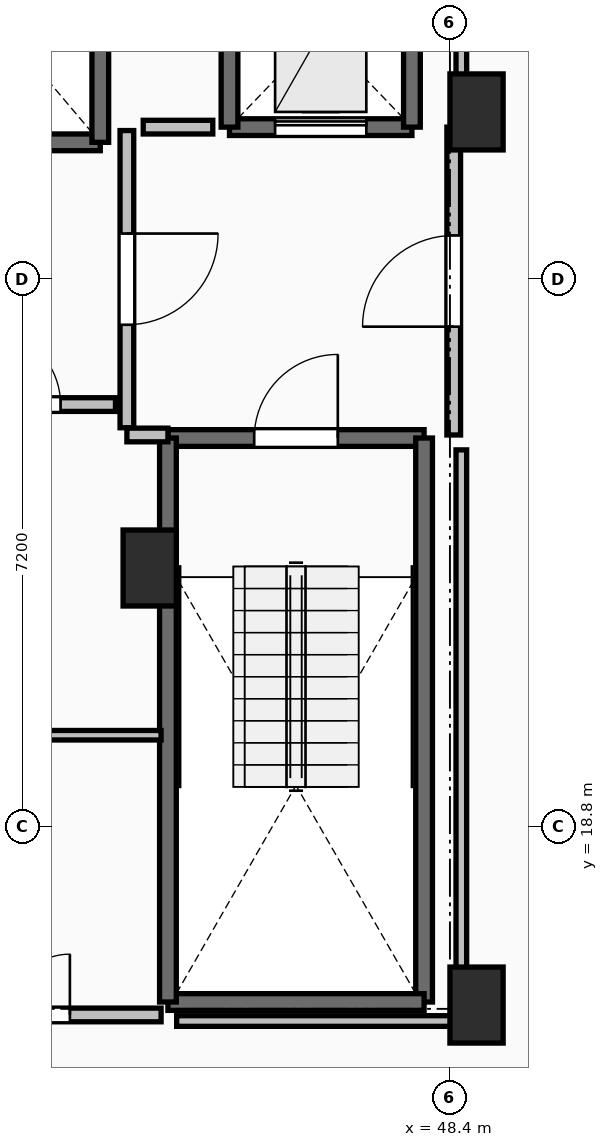
"""IFC4 building model, lengths in metres.
Left out: names, types, materials, properties, quantities, classifications, styles, units other than length and angle.
Written with IfcOpenShell. Run it as: python <this file> out.ifc"""

import sys

from ifc_helpers import new_model, si_unit, direction, frame, frame_2d, origin, origin_2d, place, context, subcontext, project, spatial, rectangle, extrude, element, fill, save


model = new_model("IFC4")
c1 = context("Model", 3, precision=1e-05, world=origin(), true_north=direction((0.0, 1.0)))
c2 = subcontext(c1, "Body", "Model", "MODEL_VIEW")
j1 = project(units=[si_unit("LENGTHUNIT", "METRE"), si_unit("PLANEANGLEUNIT", "RADIAN")], contexts=[c1])
p1 = place(None, origin())
s1 = spatial("IfcSite", under=j1, at=p1, CompositionType="ELEMENT")
p2 = place(p1, origin())
s2 = spatial("IfcBuilding", under=s1, at=p2, CompositionType="ELEMENT")
p3 = place(p2, frame((0.0, 0.0, 217.85)))
s3 = spatial("IfcBuildingStorey", under=s2, at=p3, CompositionType="ELEMENT", Elevation=217.85)
for number, where, z_axis, x_axis in (
    (1, (48.75, 28.2, 0.0), (0.0, 0.0, 1.0), (1.0, 0.0, 0.0)),
    (2, (48.75, 16.45, 0.0), (0.0, 0.0, 1.0), (1.0, 0.0, 0.0)),
    (3, (44.45, 22.2, 0.0), (0.0, 0.0, 1.0), (1.0, 0.0, 0.0)),
):
    element("IfcColumn", number, at=place(p3, frame(where, z_axis=z_axis, x_axis=x_axis)), inside=s3, PredefinedType="PILASTER", context=c2, shape_type="SweptSolid", body=[
        extrude(rectangle(XDim=0.7, YDim=1.0, at=origin_2d()), origin(), (0.0, 0.0, 1.0), 3.55),
    ])
p4 = place(p3, frame((44.69, 23.91, 0.0), z_axis=(0.0, 0.0, 1.0), x_axis=(1.0, 0.0, 0.0)))
e4 = element("IfcWall", 4, at=p4, inside=s3, PredefinedType="SOLIDWALL", context=c2, shape_type="SweptSolid", body=[
    extrude(rectangle(XDim=3.37, YDim=0.22, at=frame_2d((1.685, 0.0))), origin(), (0.0, 0.0, 1.0), 3.29),
])
p5 = place(p4, frame((1.135, 0.0, 0.0)))
e5 = element("IfcOpeningElement", 5, at=p5, cuts=e4, PredefinedType="OPENING", context=c2, shape_type="SweptSolid", body=[
    extrude(rectangle(XDim=1.1, YDim=2.15, at=frame_2d((0.55, 1.075))), frame((0.0, 0.125, 0.0), z_axis=(0.0, -1.0, 0.0), x_axis=(1.0, 0.0, 0.0)), (0.0, 0.0, 1.0), 0.25),
])
p6 = place(p3, frame((48.06, 23.91, 0.0), z_axis=(0.0, 0.0, 1.0), x_axis=(0.0, -1.0, 0.0)))
e6 = element("IfcWall", 6, at=p6, inside=s3, PredefinedType="SOLIDWALL", context=c2, shape_type="SweptSolid", body=[
    extrude(rectangle(XDim=7.42, YDim=0.22, at=frame_2d((3.71, 0.0))), origin(), (0.0, 0.0, 1.0), 3.29),
])
p7 = place(p3, frame((48.06, 16.49, 0.0), z_axis=(0.0, 0.0, 1.0), x_axis=(-1.0, 0.0, 0.0)))
e7 = element("IfcWall", 7, at=p7, inside=s3, PredefinedType="SOLIDWALL", context=c2, shape_type="SweptSolid", body=[
    extrude(rectangle(XDim=3.37, YDim=0.22, at=frame_2d((1.685, 0.0))), origin(), (0.0, 0.0, 1.0), 3.29),
])
p8 = place(p3, frame((44.69, 16.49, 0.0), z_axis=(0.0, 0.0, 1.0), x_axis=(0.0, 1.0, 0.0)))
e8 = element("IfcWall", 8, at=p8, inside=s3, PredefinedType="SOLIDWALL", context=c2, shape_type="SweptSolid", body=[
    extrude(rectangle(XDim=7.42, YDim=0.22, at=frame_2d((3.71, 0.0))), origin(), (0.0, 0.0, 1.0), 3.29),
])
p9 = place(p3, frame((41.6, 27.8, 0.0), z_axis=(0.0, 0.0, 1.0), x_axis=(1.0, 0.0, 0.0)))
e9 = element("IfcWall", 9, at=p9, inside=s3, PredefinedType="SOLIDWALL", context=c2, shape_type="SweptSolid", body=[
    extrude(rectangle(XDim=2.2, YDim=0.22, at=frame_2d((1.1, 0.0))), origin(), (0.0, 0.0, 1.0), 3.29),
])
p10 = place(p3, frame((43.8, 27.8, 0.0), z_axis=(0.0, 0.0, 1.0), x_axis=(0.0, 1.0, 0.0)))
e10 = element("IfcWall", 10, at=p10, inside=s3, PredefinedType="SOLIDWALL", context=c2, shape_type="SweptSolid", body=[
    extrude(rectangle(XDim=2.6, YDim=0.22, at=frame_2d((1.3, 0.0))), origin(), (0.0, 0.0, 1.0), 3.29),
])
p11 = place(p3, frame((45.5, 28.0, 0.0), z_axis=(0.0, 0.0, 1.0), x_axis=(1.0, 0.0, 0.0)))
e11 = element("IfcWall", 11, at=p11, inside=s3, PredefinedType="SHEAR", context=c2, shape_type="SweptSolid", body=[
    extrude(rectangle(XDim=2.4, YDim=0.22, at=frame_2d((1.2, 0.0))), origin(), (0.0, 0.0, 1.0), 3.29),
])
p12 = place(p11, frame((0.6, 0.0, 0.0)))
e12 = element("IfcOpeningElement", 12, at=p12, cuts=e11, PredefinedType="OPENING", context=c2, shape_type="SweptSolid", body=[
    extrude(rectangle(XDim=1.2, YDim=2.2, at=frame_2d((0.6, 1.1))), frame((0.0, 0.125, 0.0), z_axis=(0.0, -1.0, 0.0), x_axis=(1.0, 0.0, 0.0)), (0.0, 0.0, 1.0), 0.25),
])
for number, where, z_axis, x_axis in (
    (13, (47.9, 28.0, 0.0), (0.0, 0.0, 1.0), (0.0, 1.0, 0.0)),
    (14, (45.5, 30.5, 0.0), (0.0, 0.0, 1.0), (0.0, -1.0, 0.0)),
):
    element("IfcWall", number, at=place(p3, frame(where, z_axis=z_axis, x_axis=x_axis)), inside=s3, PredefinedType="SHEAR", context=c2, shape_type="SweptSolid", body=[
        extrude(rectangle(XDim=2.5, YDim=0.22, at=frame_2d((1.25, 0.0))), origin(), (0.0, 0.0, 1.0), 3.29),
    ])
p13 = place(p3, frame((44.15, 27.955, 0.0), z_axis=(0.0, 0.0, 1.0), x_axis=(0.0, -1.0, 0.0)))
e15 = element("IfcWall", 15, at=p13, inside=s3, PredefinedType="PARTITIONING", context=c2, shape_type="SweptSolid", body=[
    extrude(rectangle(XDim=3.91, YDim=0.18, at=frame_2d((1.955, 0.0))), origin(), (0.0, 0.0, 1.0), 3.29),
])
p14 = place(p13, frame((1.355, 0.0, 0.0)))
e16 = element("IfcOpeningElement", 16, at=p14, cuts=e15, PredefinedType="OPENING", context=c2, shape_type="SweptSolid", body=[
    extrude(rectangle(XDim=1.2, YDim=2.15, at=frame_2d((0.6, 1.075))), frame((0.0, 0.105, 0.0), z_axis=(0.0, -1.0, 0.0), x_axis=(1.0, 0.0, 0.0)), (0.0, 0.0, 1.0), 0.21),
])
p15 = place(p3, frame((44.15, 23.95, 0.0), z_axis=(0.0, 0.0, 1.0), x_axis=(1.0, 0.0, 0.0)))
e17 = element("IfcWall", 17, at=p15, inside=s3, PredefinedType="PARTITIONING", context=c2, shape_type="SweptSolid", body=[
    extrude(rectangle(XDim=0.54, YDim=0.18, at=frame_2d((0.27, 0.0))), origin(), (0.0, 0.0, 1.0), 3.29),
])
p16 = place(p3, frame((48.45, 23.95, 0.0), z_axis=(0.0, 0.0, 1.0), x_axis=(0.0, 1.0, 0.0)))
e18 = element("IfcWall", 18, at=p16, inside=s3, PredefinedType="PARTITIONING", context=c2, shape_type="SweptSolid", body=[
    extrude(rectangle(XDim=4.05, YDim=0.18, at=frame_2d((2.025, 0.0))), origin(), (0.0, 0.0, 1.0), 3.29),
])
p17 = place(p16, frame((1.425, 0.0, 0.0)))
e19 = element("IfcOpeningElement", 19, at=p17, cuts=e18, PredefinedType="OPENING", context=c2, shape_type="SweptSolid", body=[
    extrude(rectangle(XDim=1.2, YDim=2.15, at=frame_2d((0.6, 1.075))), frame((0.0, 0.105, 0.0), z_axis=(0.0, -1.0, 0.0), x_axis=(1.0, 0.0, 0.0)), (0.0, 0.0, 1.0), 0.21),
])
p18 = place(p3, frame((41.555, 24.35, 0.0), z_axis=(0.0, 0.0, 1.0), x_axis=(1.0, 0.0, 0.0)))
e20 = element("IfcWall", 20, at=p18, inside=s3, PredefinedType="PARTITIONING", context=c2, shape_type="SweptSolid", body=[
    extrude(rectangle(XDim=2.445, YDim=0.18, at=frame_2d((1.223, 0.0))), origin(), (0.0, 0.0, 1.0), 3.29),
])
p19 = place(p18, frame((0.722, 0.0, 0.0)))
e21 = element("IfcOpeningElement", 21, at=p19, cuts=e20, PredefinedType="OPENING", context=c2, shape_type="SweptSolid", body=[
    extrude(rectangle(XDim=1.0, YDim=2.15, at=frame_2d((0.5, 1.075))), frame((0.0, 0.105, 0.0), z_axis=(0.0, -1.0, 0.0), x_axis=(1.0, 0.0, 0.0)), (0.0, 0.0, 1.0), 0.21),
])
p20 = place(p3, frame((44.6, 20.0, 0.0), z_axis=(0.0, 0.0, 1.0), x_axis=(-1.0, 0.0, 0.0)))
e22 = element("IfcWall", 22, at=p20, inside=s3, PredefinedType="PARTITIONING", context=c2, shape_type="SweptSolid", body=[
    extrude(rectangle(XDim=3.2, YDim=0.125, at=frame_2d((1.6, 0.0))), origin(), (0.0, 0.0, 1.0), 3.29),
])
p21 = place(p3, frame((41.4, 16.32, 0.0), z_axis=(0.0, 0.0, 1.0), x_axis=(1.0, 0.0, 0.0)))
e23 = element("IfcWall", 23, at=p21, inside=s3, PredefinedType="PARTITIONING", context=c2, shape_type="SweptSolid", body=[
    extrude(rectangle(XDim=3.2, YDim=0.18, at=frame_2d((1.6, 0.0))), origin(), (0.0, 0.0, 1.0), 3.29),
])
p22 = place(p21, frame((1.2, 0.0, 0.0)))
e24 = element("IfcOpeningElement", 24, at=p22, cuts=e23, PredefinedType="OPENING", context=c2, shape_type="SweptSolid", body=[
    extrude(rectangle(XDim=0.8, YDim=2.05, at=frame_2d((0.4, 1.025))), frame((0.0, 0.105, 0.0), z_axis=(0.0, -1.0, 0.0), x_axis=(1.0, 0.0, 0.0)), (0.0, 0.0, 1.0), 0.21),
])
p23 = place(p3, frame((45.28, 28.0, 0.0), z_axis=(0.0, 0.0, 1.0), x_axis=(-1.0, 0.0, 0.0)))
e25 = element("IfcWall", 25, at=p23, inside=s3, PredefinedType="PARTITIONING", context=c2, shape_type="SweptSolid", body=[
    extrude(rectangle(XDim=0.915, YDim=0.18, at=frame_2d((0.458, 0.0))), origin(), (0.0, 0.0, 1.0), 3.29),
])
p24 = place(p3, frame((48.55, 28.196, 0.0), z_axis=(0.0, 0.0, 1.0), x_axis=(0.0, 1.0, 0.0)))
e26 = element("IfcWall", 26, at=p24, inside=s3, PredefinedType="PARTITIONING", context=c2, shape_type="SweptSolid", body=[
    extrude(rectangle(XDim=5.254, YDim=0.14, at=frame_2d((2.627, 0.0))), origin(), (0.0, 0.0, 1.0), 2.482),
])
p25 = place(p3, frame((44.805, 16.24, 0.0), z_axis=(0.0, 0.0, 1.0), x_axis=(1.0, 0.0, 0.0)))
e27 = element("IfcWall", 27, at=p25, inside=s3, PredefinedType="PARTITIONING", context=c2, shape_type="SweptSolid", body=[
    extrude(rectangle(XDim=3.745, YDim=0.14, at=frame_2d((1.873, 0.0))), origin(), (0.0, 0.0, 1.0), 2.482),
])
p26 = place(p3, frame((48.55, 16.24, 0.0), z_axis=(0.0, 0.0, 1.0), x_axis=(0.0, 1.0, 0.0)))
e28 = element("IfcWall", 28, at=p26, inside=s3, PredefinedType="PARTITIONING", context=c2, shape_type="SweptSolid", body=[
    extrude(rectangle(XDim=7.514, YDim=0.14, at=frame_2d((3.757, 0.0))), origin(), (0.0, 0.0, 1.0), 2.482),
])
p27 = place(p5, origin())
e29 = element("IfcDoor", 29, at=p27, inside=s3, OperationType="SINGLE_SWING_RIGHT", PredefinedType="DOOR", context=c2, shape_type="SweptSolid", body=[
    extrude(rectangle(XDim=1.1, YDim=2.15, at=frame_2d((0.55, 1.075))), frame((0.0, 0.025, 0.0), z_axis=(0.0, -1.0, 0.0), x_axis=(1.0, 0.0, 0.0)), (0.0, 0.0, 1.0), 0.05),
])
fill(e5, e29)
p28 = place(p12, origin())
e30 = element("IfcDoor", 30, at=p28, inside=s3, OperationType="SLIDING_TO_LEFT", PredefinedType="DOOR", context=c2, shape_type="SweptSolid", body=[
    extrude(rectangle(XDim=1.2, YDim=2.2, at=frame_2d((0.6, 1.1))), frame((0.0, 0.025, 0.0), z_axis=(0.0, -1.0, 0.0), x_axis=(1.0, 0.0, 0.0)), (0.0, 0.0, 1.0), 0.05),
])
fill(e12, e30)
p29 = place(p14, origin())
e31 = element("IfcDoor", 31, at=p29, inside=s3, OperationType="SINGLE_SWING_LEFT", PredefinedType="DOOR", context=c2, shape_type="SweptSolid", body=[
    extrude(rectangle(XDim=1.2, YDim=2.15, at=frame_2d((0.6, 1.075))), frame((0.0, 0.025, 0.0), z_axis=(0.0, -1.0, 0.0), x_axis=(1.0, 0.0, 0.0)), (0.0, 0.0, 1.0), 0.05),
])
fill(e16, e31)
p30 = place(p17, origin())
e32 = element("IfcDoor", 32, at=p30, inside=s3, OperationType="SINGLE_SWING_LEFT", PredefinedType="DOOR", context=c2, shape_type="SweptSolid", body=[
    extrude(rectangle(XDim=1.2, YDim=2.15, at=frame_2d((0.6, 1.075))), frame((0.0, 0.025, 0.0), z_axis=(0.0, -1.0, 0.0), x_axis=(1.0, 0.0, 0.0)), (0.0, 0.0, 1.0), 0.05),
])
fill(e19, e32)
p31 = place(p19, origin())
e33 = element("IfcDoor", 33, at=p31, inside=s3, OperationType="SINGLE_SWING_LEFT", PredefinedType="DOOR", context=c2, shape_type="SweptSolid", body=[
    extrude(rectangle(XDim=1.0, YDim=2.15, at=frame_2d((0.5, 1.075))), frame((0.0, 0.025, 0.0), z_axis=(0.0, -1.0, 0.0), x_axis=(1.0, 0.0, 0.0)), (0.0, 0.0, 1.0), 0.05),
])
fill(e21, e33)
p32 = place(p22, origin())
e34 = element("IfcDoor", 34, at=p32, inside=s3, OperationType="SINGLE_SWING_RIGHT", PredefinedType="DOOR", context=c2, shape_type="SweptSolid", body=[
    extrude(rectangle(XDim=0.8, YDim=2.05, at=frame_2d((0.4, 1.025))), frame((0.0, 0.025, 0.0), z_axis=(0.0, -1.0, 0.0), x_axis=(1.0, 0.0, 0.0)), (0.0, 0.0, 1.0), 0.05),
])
fill(e24, e34)
save(model, sys.argv[1])
